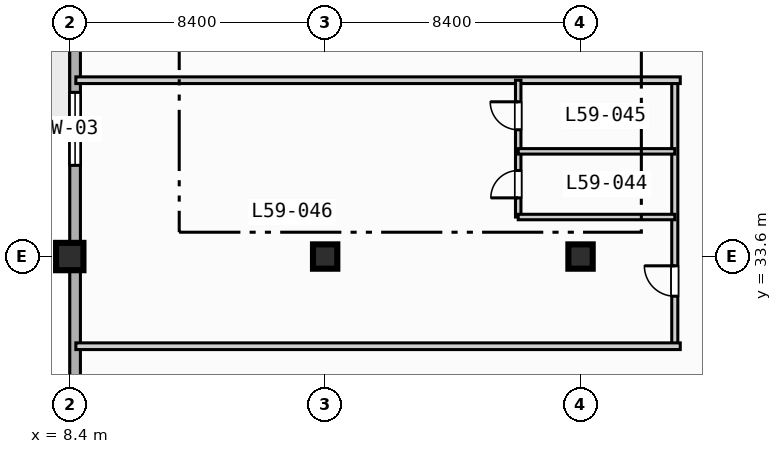
"""IFC4 building model, lengths in metres.
Left out: names, types, materials, properties, quantities, classifications, styles, units other than length and angle.
Written with IfcOpenShell. Run it as: python <this file> out.ifc"""

import sys

from ifc_helpers import new_model, si_unit, direction, frame, frame_2d, origin, origin_2d, place, context, subcontext, project, spatial, rectangle, extrude, element, fill, save


model = new_model("IFC4")
c1 = context("Model", 3, precision=1e-05, world=origin(), true_north=direction((0.0, 1.0)))
c2 = subcontext(c1, "Body", "Model", "MODEL_VIEW")
j1 = project(units=[si_unit("LENGTHUNIT", "METRE"), si_unit("PLANEANGLEUNIT", "RADIAN")], contexts=[c1])
p1 = place(None, origin())
s1 = spatial("IfcSite", under=j1, at=p1, CompositionType="ELEMENT")
p2 = place(p1, origin())
s2 = spatial("IfcBuilding", under=s1, at=p2, CompositionType="ELEMENT")
p3 = place(p2, frame((0.0, 0.0, 241.6)))
s3 = spatial("IfcBuildingStorey", under=s2, at=p3, CompositionType="ELEMENT", Elevation=241.6)
p4 = place(p3, frame((8.4, 33.6, 0.0), z_axis=(0.0, 0.0, 1.0), x_axis=(1.0, 0.0, 0.0)))
e1 = element("IfcColumn", 1, at=p4, inside=s3, PredefinedType="COLUMN", context=c2, shape_type="SweptSolid", body=[
    extrude(rectangle(XDim=0.9, YDim=0.9, at=origin_2d()), origin(), (0.0, 0.0, 1.0), 3.7),
])
for number, where, z_axis, x_axis in (
    (2, (16.8, 33.6, 0.0), (0.0, 0.0, 1.0), (1.0, 0.0, 0.0)),
    (3, (25.2, 33.6, 0.0), (0.0, 0.0, 1.0), (1.0, 0.0, 0.0)),
):
    element("IfcColumn", number, at=place(p3, frame(where, z_axis=z_axis, x_axis=x_axis)), inside=s3, PredefinedType="COLUMN", context=c2, shape_type="SweptSolid", body=[
        extrude(rectangle(XDim=0.8, YDim=0.8, at=origin_2d()), origin(), (0.0, 0.0, 1.0), 3.7),
    ])
p5 = place(p3, frame((8.575, 11.575, 0.0), z_axis=(0.0, 0.0, 1.0), x_axis=(0.0, 1.0, 0.0)))
e4 = element("IfcWall", 4, at=p5, inside=s3, PredefinedType="STANDARD", context=c2, shape_type="SweptSolid", body=[
    extrude(rectangle(XDim=60.85, YDim=0.35, at=frame_2d((30.425, 0.0))), origin(), (0.0, 0.0, 1.0), 3.47),
])
p6 = place(p5, frame((33.925, 0.0, 0.0)))
e5 = element("IfcOpeningElement", 5, at=p6, cuts=e4, PredefinedType="OPENING", context=c2, shape_type="SweptSolid", body=[
    extrude(rectangle(XDim=1.4, YDim=2.2, at=frame_2d((0.7, 1.1))), frame((0.0, 0.185, 0.0), z_axis=(0.0, -1.0, 0.0), x_axis=(1.0, 0.0, 0.0)), (0.0, 0.0, 1.0), 0.37),
])
p7 = place(p5, frame((25.025, 0.0, 0.85)))
e6 = element("IfcOpeningElement", 6, at=p7, cuts=e4, PredefinedType="OPENING", context=c2, shape_type="SweptSolid", body=[
    extrude(rectangle(XDim=2.4, YDim=1.95, at=frame_2d((1.2, 0.975))), frame((0.0, 0.185, 0.0), z_axis=(0.0, -1.0, 0.0), x_axis=(1.0, 0.0, 0.0)), (0.0, 0.0, 1.0), 0.37),
])
p8 = place(p5, frame((41.825, 0.0, 0.85)))
e7 = element("IfcOpeningElement", 7, at=p8, cuts=e4, PredefinedType="OPENING", context=c2, shape_type="SweptSolid", body=[
    extrude(rectangle(XDim=2.4, YDim=1.95, at=frame_2d((1.2, 0.975))), frame((0.0, 0.185, 0.0), z_axis=(0.0, -1.0, 0.0), x_axis=(1.0, 0.0, 0.0)), (0.0, 0.0, 1.0), 0.37),
])
p9 = place(p3, frame((28.3, 30.65, 0.0), z_axis=(0.0, 0.0, 1.0), x_axis=(0.0, 1.0, 0.0)))
e8 = element("IfcWall", 8, at=p9, inside=s3, PredefinedType="PARTITIONING", context=c2, shape_type="SweptSolid", body=[
    extrude(rectangle(XDim=8.75, YDim=0.2, at=frame_2d((4.375, 0.0))), origin(), (0.0, 0.0, 1.0), 3.47),
])
p10 = place(p9, frame((1.645, 0.0, 0.0)))
e9 = element("IfcOpeningElement", 9, at=p10, cuts=e8, PredefinedType="OPENING", context=c2, shape_type="SweptSolid", body=[
    extrude(rectangle(XDim=1.0, YDim=2.15, at=frame_2d((0.5, 1.075))), frame((0.0, 0.11, 0.0), z_axis=(0.0, -1.0, 0.0), x_axis=(1.0, 0.0, 0.0)), (0.0, 0.0, 1.0), 0.22),
])
for number, where, z_axis, x_axis in (
    (10, (8.6, 30.65, 0.0), (0.0, 0.0, 1.0), (1.0, 0.0, 0.0)),
    (11, (8.6, 39.4, 0.0), (0.0, 0.0, 1.0), (1.0, 0.0, 0.0)),
):
    element("IfcWall", number, at=place(p3, frame(where, z_axis=z_axis, x_axis=x_axis)), inside=s3, PredefinedType="PARTITIONING", context=c2, shape_type="SweptSolid", body=[
        extrude(rectangle(XDim=19.88, YDim=0.22, at=frame_2d((9.94, 0.0))), origin(), (0.0, 0.0, 1.0), 3.47),
    ])
p11 = place(p3, frame((23.15, 34.9, 0.0), z_axis=(0.0, 0.0, 1.0), x_axis=(0.0, 1.0, 0.0)))
e12 = element("IfcWall", 12, at=p11, inside=s3, PredefinedType="PLUMBINGWALL", context=c2, shape_type="SweptSolid", body=[
    extrude(rectangle(XDim=4.5, YDim=0.18, at=frame_2d((2.25, 0.0))), origin(), (0.0, 0.0, 1.0), 3.47),
])
p12 = place(p11, frame((0.63, 0.0, 0.0)))
e13 = element("IfcOpeningElement", 13, at=p12, cuts=e12, PredefinedType="OPENING", context=c2, shape_type="SweptSolid", body=[
    extrude(rectangle(XDim=0.9, YDim=2.1, at=frame_2d((0.45, 1.05))), frame((0.0, 0.1, 0.0), z_axis=(0.0, -1.0, 0.0), x_axis=(1.0, 0.0, 0.0)), (0.0, 0.0, 1.0), 0.2),
])
p13 = place(p11, frame((2.87, 0.0, 0.0)))
e14 = element("IfcOpeningElement", 14, at=p13, cuts=e12, PredefinedType="OPENING", context=c2, shape_type="SweptSolid", body=[
    extrude(rectangle(XDim=0.92, YDim=2.1, at=frame_2d((0.46, 1.05))), frame((0.0, 0.1, 0.0), z_axis=(0.0, -1.0, 0.0), x_axis=(1.0, 0.0, 0.0)), (0.0, 0.0, 1.0), 0.2),
])
for number, where, z_axis, x_axis in (
    (15, (23.15, 34.9, 0.0), (0.0, 0.0, 1.0), (1.0, 0.0, 0.0)),
    (16, (23.15, 37.06, 0.0), (0.0, 0.0, 1.0), (1.0, 0.0, 0.0)),
):
    element("IfcWall", number, at=place(p3, frame(where, z_axis=z_axis, x_axis=x_axis)), inside=s3, PredefinedType="PLUMBINGWALL", context=c2, shape_type="SweptSolid", body=[
        extrude(rectangle(XDim=5.15, YDim=0.18, at=frame_2d((2.575, 0.0))), origin(), (0.0, 0.0, 1.0), 3.47),
    ])
p14 = place(p7, origin())
e17 = element("IfcWindow", 17, at=p14, inside=s3, PartitioningType="SINGLE_PANEL", PredefinedType="WINDOW", context=c2, shape_type="SweptSolid", body=[
    extrude(rectangle(XDim=2.4, YDim=1.95, at=frame_2d((1.2, 0.975))), frame((0.0, 0.03, 0.0), z_axis=(0.0, -1.0, 0.0), x_axis=(1.0, 0.0, 0.0)), (0.0, 0.0, 1.0), 0.06),
])
fill(e6, e17)
p15 = place(p10, origin())
e18 = element("IfcDoor", 18, at=p15, inside=s3, OperationType="SINGLE_SWING_RIGHT", PredefinedType="DOOR", context=c2, shape_type="SweptSolid", body=[
    extrude(rectangle(XDim=1.0, YDim=2.15, at=frame_2d((0.5, 1.075))), frame((0.0, 0.025, 0.0), z_axis=(0.0, -1.0, 0.0), x_axis=(1.0, 0.0, 0.0)), (0.0, 0.0, 1.0), 0.05),
])
fill(e9, e18)
p16 = place(p12, origin())
e19 = element("IfcDoor", 19, at=p16, inside=s3, OperationType="SINGLE_SWING_LEFT", PredefinedType="DOOR", context=c2, shape_type="SweptSolid", body=[
    extrude(rectangle(XDim=0.9, YDim=2.1, at=frame_2d((0.45, 1.05))), frame((0.0, 0.025, 0.0), z_axis=(0.0, -1.0, 0.0), x_axis=(1.0, 0.0, 0.0)), (0.0, 0.0, 1.0), 0.05),
])
fill(e13, e19)
p17 = place(p13, origin())
e20 = element("IfcDoor", 20, at=p17, inside=s3, OperationType="SINGLE_SWING_RIGHT", PredefinedType="DOOR", context=c2, shape_type="SweptSolid", body=[
    extrude(rectangle(XDim=0.92, YDim=2.1, at=frame_2d((0.46, 1.05))), frame((0.0, 0.025, 0.0), z_axis=(0.0, -1.0, 0.0), x_axis=(1.0, 0.0, 0.0)), (0.0, 0.0, 1.0), 0.05),
])
fill(e14, e20)
save(model, sys.argv[1])
